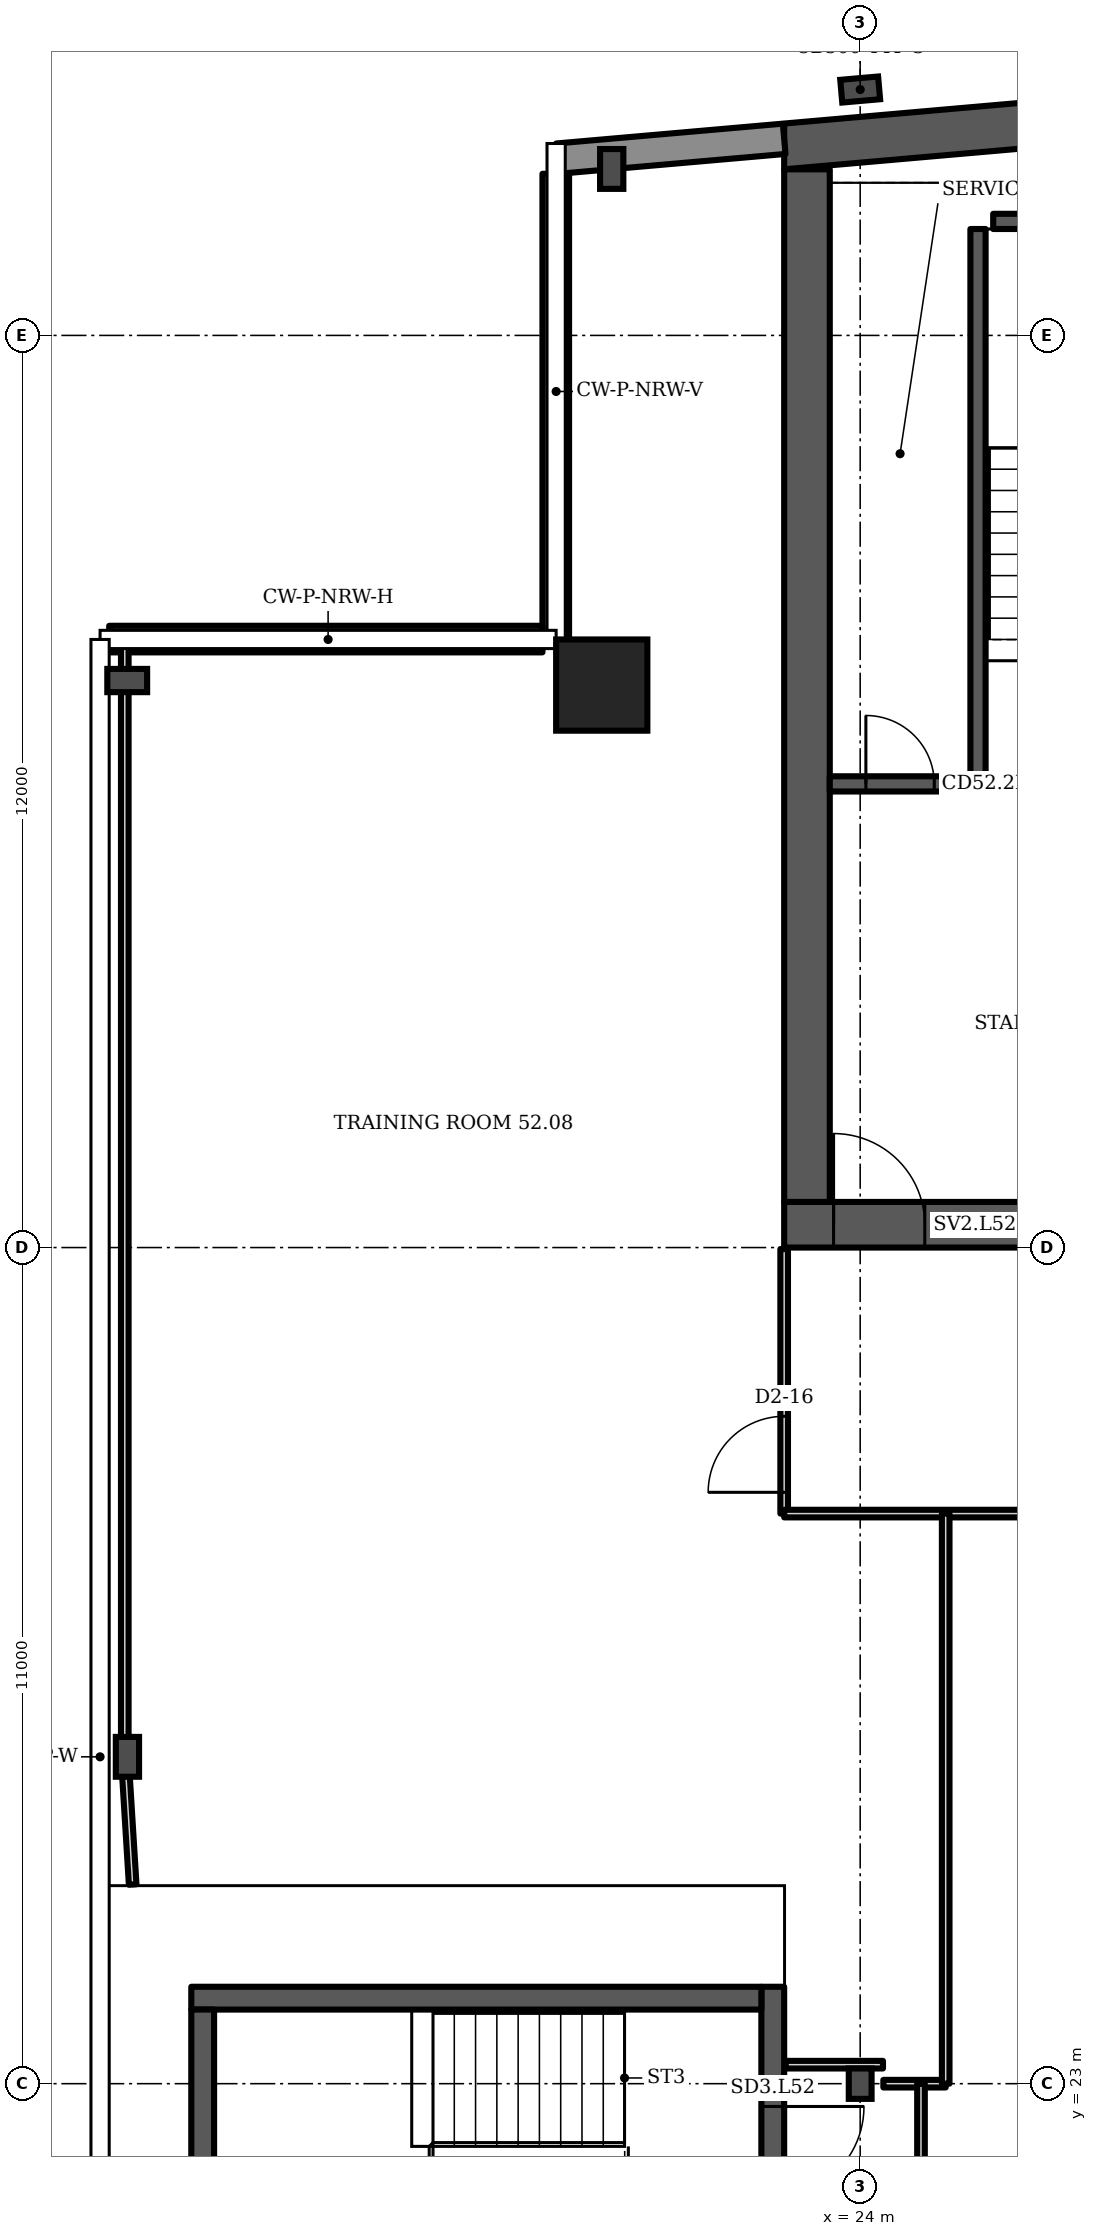
"""IFC4 building model, lengths in metres.
Left out: names, types, materials, properties, quantities, classifications, styles, units other than length and angle.
Written with IfcOpenShell. Run it as: python <this file> out.ifc"""

import sys

from ifc_helpers import new_model, si_unit, direction, frame, frame_2d, origin, origin_2d, place, context, subcontext, project, spatial, polyline, rectangle, i_section, outline, extrude, element, fill, save


model = new_model("IFC4")
c1 = context("Model", 3, precision=1e-05, world=origin(), true_north=direction((0.0, 1.0)))
c2 = subcontext(c1, "Body", "Model", "MODEL_VIEW")
j1 = project(units=[si_unit("LENGTHUNIT", "METRE"), si_unit("PLANEANGLEUNIT", "RADIAN")], contexts=[c1])
p1 = place(None, origin())
s1 = spatial("IfcSite", under=j1, at=p1, CompositionType="ELEMENT")
p2 = place(p1, origin())
s2 = spatial("IfcBuilding", under=s1, at=p2, CompositionType="ELEMENT")
p3 = place(p2, frame((0.0, 0.0, 210.7)))
s3 = spatial("IfcBuildingStorey", under=s2, at=p3, CompositionType="ELEMENT", Elevation=210.7)
p4 = place(p3, origin())
e1 = element("IfcWall", 1, at=p4, inside=s3, PredefinedType="SHEAR", context=c2, shape_type="SweptSolid", body=[
    extrude(outline(polyline([(23.0, 48.185), (40.5, 49.716), (58.0, 48.185), (58.0, 48.787), (40.5, 50.318), (23.0, 48.787), (23.0, 48.185)])), origin(), (0.0, 0.0, 1.0), 3.6),
])
p5 = place(p3, frame((23.0, 34.3, 0.0), z_axis=(0.0, 0.0, 1.0), x_axis=(1.0, 0.0, 0.0)))
e2 = element("IfcWall", 2, at=p5, inside=s3, PredefinedType="SHEAR", context=c2, shape_type="SweptSolid", body=[
    extrude(rectangle(XDim=35.0, YDim=0.6, at=frame_2d((17.5, 0.0))), origin(), (0.0, 0.0, 1.0), 3.6),
])
p6 = place(p5, frame((0.65, 0.0, 0.0)))
e3 = element("IfcOpeningElement", 3, at=p6, cuts=e2, PredefinedType="OPENING", context=c2, shape_type="SweptSolid", body=[
    extrude(rectangle(XDim=1.2, YDim=2.1, at=frame_2d((0.6, 1.05))), frame((0.0, 0.31, 0.0), z_axis=(0.0, -1.0, 0.0), x_axis=(1.0, 0.0, 0.0)), (0.0, 0.0, 1.0), 0.62),
])
p7 = place(p5, frame((7.717, 0.0, 0.0)))
e4 = element("IfcOpeningElement", 4, at=p7, cuts=e2, PredefinedType="OPENING", context=c2, shape_type="SweptSolid", body=[
    extrude(rectangle(XDim=1.1, YDim=2.1, at=frame_2d((0.55, 1.05))), frame((0.0, 0.31, 0.0), z_axis=(0.0, -1.0, 0.0), x_axis=(1.0, 0.0, 0.0)), (0.0, 0.0, 1.0), 0.62),
])
p8 = place(p5, frame((12.183, 0.0, 0.0)))
e5 = element("IfcOpeningElement", 5, at=p8, cuts=e2, PredefinedType="OPENING", context=c2, shape_type="SweptSolid", body=[
    extrude(rectangle(XDim=1.1, YDim=2.1, at=frame_2d((0.55, 1.05))), frame((0.0, 0.31, 0.0), z_axis=(0.0, -1.0, 0.0), x_axis=(1.0, 0.0, 0.0)), (0.0, 0.0, 1.0), 0.62),
])
p9 = place(p5, frame((9.8, 0.0, 0.0)))
e6 = element("IfcOpeningElement", 6, at=p9, cuts=e2, PredefinedType="OPENING", context=c2, shape_type="SweptSolid", body=[
    extrude(rectangle(XDim=1.4, YDim=2.1, at=frame_2d((0.7, 1.05))), frame((0.0, 0.31, 0.0), z_axis=(0.0, -1.0, 0.0), x_axis=(1.0, 0.0, 0.0)), (0.0, 0.0, 1.0), 0.62),
])
p10 = place(p5, frame((14.717, 0.0, 0.0)))
e7 = element("IfcOpeningElement", 7, at=p10, cuts=e2, PredefinedType="OPENING", context=c2, shape_type="SweptSolid", body=[
    extrude(rectangle(XDim=1.1, YDim=2.1, at=frame_2d((0.55, 1.05))), frame((0.0, 0.31, 0.0), z_axis=(0.0, -1.0, 0.0), x_axis=(1.0, 0.0, 0.0)), (0.0, 0.0, 1.0), 0.62),
])
p11 = place(p5, frame((16.95, 0.0, 0.0)))
e8 = element("IfcOpeningElement", 8, at=p11, cuts=e2, PredefinedType="OPENING", context=c2, shape_type="SweptSolid", body=[
    extrude(rectangle(XDim=1.1, YDim=2.1, at=frame_2d((0.55, 1.05))), frame((0.0, 0.31, 0.0), z_axis=(0.0, -1.0, 0.0), x_axis=(1.0, 0.0, 0.0)), (0.0, 0.0, 1.0), 0.62),
])
p12 = place(p5, frame((19.183, 0.0, 0.0)))
e9 = element("IfcOpeningElement", 9, at=p12, cuts=e2, PredefinedType="OPENING", context=c2, shape_type="SweptSolid", body=[
    extrude(rectangle(XDim=1.1, YDim=2.1, at=frame_2d((0.55, 1.05))), frame((0.0, 0.31, 0.0), z_axis=(0.0, -1.0, 0.0), x_axis=(1.0, 0.0, 0.0)), (0.0, 0.0, 1.0), 0.62),
])
p13 = place(p5, frame((26.15, 0.0, 0.0)))
e10 = element("IfcOpeningElement", 10, at=p13, cuts=e2, PredefinedType="OPENING", context=c2, shape_type="SweptSolid", body=[
    extrude(rectangle(XDim=1.2, YDim=2.1, at=frame_2d((0.6, 1.05))), frame((0.0, 0.31, 0.0), z_axis=(0.0, -1.0, 0.0), x_axis=(1.0, 0.0, 0.0)), (0.0, 0.0, 1.0), 0.62),
])
p14 = place(p5, frame((28.767, 0.0, 0.0)))
e11 = element("IfcOpeningElement", 11, at=p14, cuts=e2, PredefinedType="OPENING", context=c2, shape_type="SweptSolid", body=[
    extrude(rectangle(XDim=1.0, YDim=2.1, at=frame_2d((0.5, 1.05))), frame((0.0, 0.31, 0.0), z_axis=(0.0, -1.0, 0.0), x_axis=(1.0, 0.0, 0.0)), (0.0, 0.0, 1.0), 0.62),
])
p15 = place(p5, frame((33.083, 0.0, 0.0)))
e12 = element("IfcOpeningElement", 12, at=p15, cuts=e2, PredefinedType="OPENING", context=c2, shape_type="SweptSolid", body=[
    extrude(rectangle(XDim=1.0, YDim=2.1, at=frame_2d((0.5, 1.05))), frame((0.0, 0.31, 0.0), z_axis=(0.0, -1.0, 0.0), x_axis=(1.0, 0.0, 0.0)), (0.0, 0.0, 1.0), 0.62),
])
p16 = place(p5, frame((30.8, 0.0, 0.0)))
e13 = element("IfcOpeningElement", 13, at=p16, cuts=e2, PredefinedType="OPENING", context=c2, shape_type="SweptSolid", body=[
    extrude(rectangle(XDim=1.4, YDim=2.1, at=frame_2d((0.7, 1.05))), frame((0.0, 0.31, 0.0), z_axis=(0.0, -1.0, 0.0), x_axis=(1.0, 0.0, 0.0)), (0.0, 0.0, 1.0), 0.62),
])
p17 = place(p3, frame((23.3, 34.6, 0.0), z_axis=(0.0, 0.0, 1.0), x_axis=(0.0, 1.0, 0.0)))
e14 = element("IfcWall", 14, at=p17, inside=s3, PredefinedType="SHEAR", context=c2, shape_type="SweptSolid", body=[
    extrude(rectangle(XDim=13.585, YDim=0.6, at=frame_2d((6.792, 0.0))), origin(), (0.0, 0.0, 1.0), 3.6),
])
p18 = place(p3, frame((20.6, 41.4, 0.0), z_axis=(0.0, 0.0, 1.0), x_axis=(1.0, 0.0, 0.0)))
e15 = element("IfcColumn", 15, at=p18, inside=s3, PredefinedType="COLUMN", context=c2, shape_type="SweptSolid", body=[
    extrude(rectangle(XDim=1.2, YDim=1.2, at=origin_2d()), origin(), (0.0, 0.0, 1.0), 3.6),
])
for number, where, z_axis, x_axis in (
    (16, (20.731, 48.19, 0.0), (0.0, 0.0, 1.0), (-1.0, 0.0, 0.0)),
    (17, (14.357, 41.46, 0.0), (0.0, 0.0, 1.0), (0.0, 1.0, 0.0)),
    (18, (14.36, 27.3, 0.0), (0.0, 0.0, 1.0), (-1.0, 0.0, 0.0)),
):
    element("IfcColumn", number, at=place(p3, frame(where, z_axis=z_axis, x_axis=x_axis)), inside=s3, PredefinedType="COLUMN", context=c2, shape_type="SweptSolid", body=[
        extrude(i_section(OverallWidth=0.306, OverallDepth=0.524, WebThickness=0.021, FlangeThickness=0.04, FilletRadius=0.027, at=origin_2d()), origin(), (0.0, 0.0, 1.0), 3.6),
    ])
p19 = place(p3, frame((24.0, 23.0, 0.0), z_axis=(0.0, 0.0, 1.0), x_axis=(1.0, 0.0, 0.0)))
e19 = element("IfcColumn", 19, at=p19, inside=s3, PredefinedType="COLUMN", context=c2, shape_type="SweptSolid", body=[
    extrude(i_section(OverallWidth=0.3, OverallDepth=0.4, WebThickness=0.013, FlangeThickness=0.024, FilletRadius=0.027, at=origin_2d()), origin(), (0.0, 0.0, 1.0), 3.6),
])
p20 = place(p3, frame((24.0, 49.235, 0.0), z_axis=(0.0, 0.0, 1.0), x_axis=(-0.087156, 0.996197, 0.0)))
e20 = element("IfcColumn", 20, at=p20, inside=s3, PredefinedType="COLUMN", context=c2, shape_type="SweptSolid", body=[
    extrude(i_section(OverallWidth=0.3, OverallDepth=0.5, WebThickness=0.014, FlangeThickness=0.028, FilletRadius=0.027, at=origin_2d()), origin(), (0.0, 0.0, 1.0), 3.6),
])
p21 = place(p3, frame((23.0, 48.587, 0.0), z_axis=(0.0, 0.0, 1.0), x_axis=(-0.996194, -0.087168, 0.0)))
e21 = element("IfcWall", 21, at=p21, inside=s3, PredefinedType="SOLIDWALL", context=c2, shape_type="SweptSolid", body=[
    extrude(rectangle(XDim=2.994, YDim=0.4, at=frame_2d((1.497, 0.0))), origin(), (0.0, 0.0, 1.0), 3.2),
])
p22 = place(p3, frame((19.995, 48.126, 0.0), z_axis=(0.0, 0.0, 1.0), x_axis=(0.0, -1.0, 0.0)))
e22 = element("IfcWall", 22, at=p22, inside=s3, PredefinedType="SOLIDWALL", context=c2, shape_type="SweptSolid", body=[
    extrude(rectangle(XDim=6.126, YDim=0.35, at=frame_2d((3.063, 0.0))), origin(), (0.0, 0.0, 1.0), 1.0),
])
p23 = place(p3, frame((19.82, 42.005, 0.0), z_axis=(0.0, 0.0, 1.0), x_axis=(-1.0, 0.0, 0.0)))
e23 = element("IfcWall", 23, at=p23, inside=s3, PredefinedType="SOLIDWALL", context=c2, shape_type="SweptSolid", body=[
    extrude(rectangle(XDim=5.7, YDim=0.35, at=frame_2d((2.85, 0.0))), origin(), (0.0, 0.0, 1.0), 1.0),
])
p24 = place(p3, frame((23.6, 40.1, 0.0), z_axis=(0.0, 0.0, 1.0), x_axis=(1.0, 0.0, 0.0)))
e24 = element("IfcWall", 24, at=p24, inside=s3, PredefinedType="SHEAR", context=c2, shape_type="SweptSolid", body=[
    extrude(rectangle(XDim=6.1, YDim=0.2, at=frame_2d((3.05, 0.0))), origin(), (0.0, 0.0, 1.0), 3.2),
])
p25 = place(p24, frame((3.325, 0.0, 0.0)))
e25 = element("IfcOpeningElement", 25, at=p25, cuts=e24, PredefinedType="OPENING", context=c2, shape_type="SweptSolid", body=[
    extrude(rectangle(XDim=1.2, YDim=2.1, at=frame_2d((0.6, 1.05))), frame((0.0, 0.11, 0.0), z_axis=(0.0, -1.0, 0.0), x_axis=(1.0, 0.0, 0.0)), (0.0, 0.0, 1.0), 0.22),
])
p26 = place(p24, frame((0.475, 0.0, 0.0)))
e26 = element("IfcOpeningElement", 26, at=p26, cuts=e24, PredefinedType="OPENING", context=c2, shape_type="SweptSolid", body=[
    extrude(rectangle(XDim=0.9, YDim=2.1, at=frame_2d((0.45, 1.05))), frame((0.0, 0.11, 0.0), z_axis=(0.0, -1.0, 0.0), x_axis=(1.0, 0.0, 0.0)), (0.0, 0.0, 1.0), 0.22),
])
p27 = place(p3, frame((25.55, 40.2, 0.0), z_axis=(0.0, 0.0, 1.0), x_axis=(0.0, 1.0, 0.0)))
e27 = element("IfcWall", 27, at=p27, inside=s3, PredefinedType="SHEAR", context=c2, shape_type="SweptSolid", body=[
    extrude(rectangle(XDim=7.2, YDim=0.2, at=frame_2d((3.6, 0.0))), origin(), (0.0, 0.0, 1.0), 3.2),
])
p28 = place(p3, frame((25.75, 47.5, 0.0), z_axis=(0.0, 0.0, 1.0), x_axis=(1.0, 0.0, 0.0)))
e28 = element("IfcWall", 28, at=p28, inside=s3, PredefinedType="SHEAR", context=c2, shape_type="SweptSolid", body=[
    extrude(rectangle(XDim=3.95, YDim=0.2, at=frame_2d((1.975, 0.0))), origin(), (0.0, 0.0, 1.0), 3.2),
])
p29 = place(p3, frame((22.85, 19.925, 0.0), z_axis=(0.0, 0.0, 1.0), x_axis=(0.0, 1.0, 0.0)))
e29 = element("IfcWall", 29, at=p29, inside=s3, PredefinedType="SHEAR", context=c2, shape_type="SweptSolid", body=[
    extrude(rectangle(XDim=4.35, YDim=0.3, at=frame_2d((2.175, 0.0))), origin(), (0.0, 0.0, 1.0), 3.2),
])
p30 = place(p29, frame((1.575, 0.0, 0.0)))
e30 = element("IfcOpeningElement", 30, at=p30, cuts=e29, PredefinedType="OPENING", context=c2, shape_type="SweptSolid", body=[
    extrude(rectangle(XDim=1.2, YDim=2.1, at=frame_2d((0.6, 1.05))), frame((0.0, 0.16, 0.0), z_axis=(0.0, -1.0, 0.0), x_axis=(1.0, 0.0, 0.0)), (0.0, 0.0, 1.0), 0.32),
])
p31 = place(p3, frame((14.325, 27.3, 0.0), z_axis=(0.0, 0.0, 1.0), x_axis=(0.0, 1.0, 0.0)))
e31 = element("IfcWall", 31, at=p31, inside=s3, PredefinedType="PARTITIONING", context=c2, shape_type="SweptSolid", body=[
    extrude(rectangle(XDim=14.68, YDim=0.1, at=frame_2d((7.34, 0.0))), origin(), (0.0, 0.0, 1.0), 2.58),
])
p32 = place(p3, frame((14.429, 25.62, 0.0), z_axis=(0.0, 0.0, 1.0), x_axis=(-0.061647, 0.998101, 0.0)))
e32 = element("IfcWall", 32, at=p32, inside=s3, PredefinedType="PARTITIONING", context=c2, shape_type="SweptSolid", body=[
    extrude(rectangle(XDim=1.683, YDim=0.1, at=frame_2d((0.842, 0.0))), origin(), (0.0, 0.0, 1.0), 3.2),
])
p33 = place(p3, frame((23.0, 30.5, 0.0), z_axis=(0.0, 0.0, 1.0), x_axis=(0.0, 1.0, 0.0)))
e33 = element("IfcWall", 33, at=p33, inside=s3, PredefinedType="PARTITIONING", context=c2, shape_type="SweptSolid", body=[
    extrude(rectangle(XDim=3.48, YDim=0.1, at=frame_2d((1.74, 0.0))), origin(), (0.0, 0.0, 1.0), 3.2),
])
p34 = place(p33, frame((0.28, 0.0, 0.0)))
e34 = element("IfcOpeningElement", 34, at=p34, cuts=e33, PredefinedType="OPENING", context=c2, shape_type="SweptSolid", body=[
    extrude(rectangle(XDim=1.0, YDim=2.1, at=frame_2d((0.5, 1.05))), frame((0.0, 0.06, 0.0), z_axis=(0.0, -1.0, 0.0), x_axis=(1.0, 0.0, 0.0)), (0.0, 0.0, 1.0), 0.12),
])
p35 = place(p3, frame((23.0, 30.5, 0.0), z_axis=(0.0, 0.0, 1.0), x_axis=(1.0, 0.0, 0.0)))
e35 = element("IfcWall", 35, at=p35, inside=s3, PredefinedType="PARTITIONING", context=c2, shape_type="SweptSolid", body=[
    extrude(rectangle(XDim=13.85, YDim=0.1, at=frame_2d((6.925, 0.0))), origin(), (0.0, 0.0, 1.0), 3.2),
])
p36 = place(p35, frame((3.545, 0.0, 0.0)))
e36 = element("IfcOpeningElement", 36, at=p36, cuts=e35, PredefinedType="OPENING", context=c2, shape_type="SweptSolid", body=[
    extrude(rectangle(XDim=1.0, YDim=2.1, at=frame_2d((0.5, 1.05))), frame((0.0, 0.06, 0.0), z_axis=(0.0, -1.0, 0.0), x_axis=(1.0, 0.0, 0.0)), (0.0, 0.0, 1.0), 0.12),
])
p37 = place(p35, frame((11.545, 0.0, 0.0)))
e37 = element("IfcOpeningElement", 37, at=p37, cuts=e35, PredefinedType="OPENING", context=c2, shape_type="SweptSolid", body=[
    extrude(rectangle(XDim=1.0, YDim=2.1, at=frame_2d((0.5, 1.05))), frame((0.0, 0.06, 0.0), z_axis=(0.0, -1.0, 0.0), x_axis=(1.0, 0.0, 0.0)), (0.0, 0.0, 1.0), 0.12),
])
p38 = place(p3, frame((23.02, 23.25, 0.0), z_axis=(0.0, 0.0, 1.0), x_axis=(1.0, 0.0, 0.0)))
e38 = element("IfcWall", 38, at=p38, inside=s3, PredefinedType="PARTITIONING", context=c2, shape_type="SweptSolid", body=[
    extrude(rectangle(XDim=1.28, YDim=0.1, at=frame_2d((0.64, 0.0))), origin(), (0.0, 0.0, 1.0), 3.2),
])
p39 = place(p3, frame((24.305, 23.0, 0.0), z_axis=(0.0, 0.0, 1.0), x_axis=(1.0, 0.0, 0.0)))
e39 = element("IfcWall", 39, at=p39, inside=s3, PredefinedType="PARTITIONING", context=c2, shape_type="SweptSolid", body=[
    extrude(rectangle(XDim=0.82, YDim=0.1, at=frame_2d((0.41, 0.0))), origin(), (0.0, 0.0, 1.0), 3.2),
])
p40 = place(p3, frame((24.8, 19.2, 0.0), z_axis=(0.0, 0.0, 1.0), x_axis=(0.0, 1.0, 0.0)))
e40 = element("IfcWall", 40, at=p40, inside=s3, PredefinedType="PARTITIONING", context=c2, shape_type="SweptSolid", body=[
    extrude(rectangle(XDim=3.8, YDim=0.1, at=frame_2d((1.9, 0.0))), origin(), (0.0, 0.0, 1.0), 3.2),
])
p41 = place(p3, frame((25.125, 23.0, 0.0), z_axis=(0.0, 0.0, 1.0), x_axis=(0.0, 1.0, 0.0)))
e41 = element("IfcWall", 41, at=p41, inside=s3, PredefinedType="PARTITIONING", context=c2, shape_type="SweptSolid", body=[
    extrude(rectangle(XDim=7.5, YDim=0.1, at=frame_2d((3.75, 0.0))), origin(), (0.0, 0.0, 1.0), 3.2),
])
p42 = place(p3, frame((15.2, 24.125, 0.0), z_axis=(0.0, 0.0, 1.0), x_axis=(1.0, 0.0, 0.0)))
e42 = element("IfcWall", 42, at=p42, inside=s3, PredefinedType="SHEAR", context=c2, shape_type="SweptSolid", body=[
    extrude(rectangle(XDim=7.5, YDim=0.3, at=frame_2d((3.75, 0.0))), origin(), (0.0, 0.0, 1.0), 3.2),
])
p43 = place(p3, frame((15.35, 20.225, 0.0), z_axis=(0.0, 0.0, 1.0), x_axis=(0.0, 1.0, 0.0)))
e43 = element("IfcWall", 43, at=p43, inside=s3, PredefinedType="SHEAR", context=c2, shape_type="SweptSolid", body=[
    extrude(rectangle(XDim=3.75, YDim=0.3, at=frame_2d((1.875, 0.0))), origin(), (0.0, 0.0, 1.0), 3.2),
])
p44 = place(p26, origin())
e44 = element("IfcDoor", 44, at=p44, inside=s3, OperationType="SINGLE_SWING_LEFT", PredefinedType="DOOR", context=c2, shape_type="SweptSolid", body=[
    extrude(rectangle(XDim=0.9, YDim=2.1, at=frame_2d((0.45, 1.05))), frame((0.0, 0.025, 0.0), z_axis=(0.0, -1.0, 0.0), x_axis=(1.0, 0.0, 0.0)), (0.0, 0.0, 1.0), 0.05),
])
fill(e26, e44)
p45 = place(p6, origin())
e45 = element("IfcDoor", 45, at=p45, inside=s3, OperationType="SINGLE_SWING_LEFT", PredefinedType="DOOR", context=c2, shape_type="SweptSolid", body=[
    extrude(rectangle(XDim=1.2, YDim=2.1, at=frame_2d((0.6, 1.05))), frame((0.0, 0.025, 0.0), z_axis=(0.0, -1.0, 0.0), x_axis=(1.0, 0.0, 0.0)), (0.0, 0.0, 1.0), 0.05),
])
fill(e3, e45)
p46 = place(p30, origin())
e46 = element("IfcDoor", 46, at=p46, inside=s3, OperationType="SINGLE_SWING_RIGHT", PredefinedType="DOOR", context=c2, shape_type="SweptSolid", body=[
    extrude(rectangle(XDim=1.2, YDim=2.1, at=frame_2d((0.6, 1.05))), frame((0.0, 0.025, 0.0), z_axis=(0.0, -1.0, 0.0), x_axis=(1.0, 0.0, 0.0)), (0.0, 0.0, 1.0), 0.05),
])
fill(e30, e46)
p47 = place(p34, origin())
e47 = element("IfcDoor", 47, at=p47, inside=s3, OperationType="SINGLE_SWING_LEFT", PredefinedType="DOOR", context=c2, shape_type="SweptSolid", body=[
    extrude(rectangle(XDim=1.0, YDim=2.1, at=frame_2d((0.5, 1.05))), frame((0.0, 0.025, 0.0), z_axis=(0.0, -1.0, 0.0), x_axis=(1.0, 0.0, 0.0)), (0.0, 0.0, 1.0), 0.05),
])
fill(e34, e47)
save(model, sys.argv[1])
